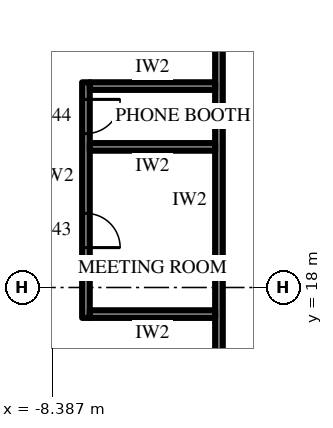
"""IFC4 building model, lengths in metres.
Left out: names, types, materials, properties, quantities, classifications, styles, units other than length and angle.
Written with IfcOpenShell. Run it as: python <this file> out.ifc"""

import sys

from ifc_helpers import new_model, si_unit, direction, frame, frame_2d, origin, place, context, subcontext, project, spatial, rectangle, extrude, element, fill, save


model = new_model("IFC4")
c1 = context("Model", 3, precision=1e-05, world=origin(), true_north=direction((0.0, 1.0)))
c2 = subcontext(c1, "Body", "Model", "MODEL_VIEW")
j1 = project(units=[si_unit("LENGTHUNIT", "METRE"), si_unit("PLANEANGLEUNIT", "RADIAN")], contexts=[c1])
p1 = place(None, origin())
s1 = spatial("IfcSite", under=j1, at=p1, CompositionType="ELEMENT")
p2 = place(p1, origin())
s2 = spatial("IfcBuilding", under=s1, at=p2, CompositionType="ELEMENT")
p3 = place(p2, frame((0.0, 0.0, 69.7)))
s3 = spatial("IfcBuildingStorey", under=s2, at=p3, CompositionType="ELEMENT", Elevation=69.7)
p4 = place(p3, frame((-4.0, 14.2, 0.0), z_axis=(0.0, 0.0, 1.0), x_axis=(0.0, 1.0, 0.0)))
e1 = element("IfcWall", 1, at=p4, inside=s3, PredefinedType="PARTITIONING", context=c2, shape_type="SweptSolid", body=[
    extrude(rectangle(XDim=12.2, YDim=0.2, at=frame_2d((6.1, 0.0))), origin(), (0.0, 0.0, 1.0), 4.0),
])
p5 = place(p4, frame((0.72, 0.0, 0.0)))
e2 = element("IfcOpeningElement", 2, at=p5, cuts=e1, PredefinedType="OPENING", context=c2, shape_type="SweptSolid", body=[
    extrude(rectangle(XDim=1.0, YDim=2.2, at=frame_2d((0.5, 1.1))), frame((0.0, 0.11, 0.0), z_axis=(0.0, -1.0, 0.0), x_axis=(1.0, 0.0, 0.0)), (0.0, 0.0, 1.0), 0.22),
])
p6 = place(p3, frame((-7.5, 17.2, 0.0), z_axis=(0.0, 0.0, 1.0), x_axis=(0.0, 1.0, 0.0)))
e3 = element("IfcWall", 3, at=p6, inside=s3, PredefinedType="PARTITIONING", context=c2, shape_type="SweptSolid", body=[
    extrude(rectangle(XDim=6.2, YDim=0.2, at=frame_2d((3.1, 0.0))), origin(), (0.0, 0.0, 1.0), 4.0),
])
p7 = place(p6, frame((1.85, 0.0, 0.0)))
e4 = element("IfcOpeningElement", 4, at=p7, cuts=e3, PredefinedType="OPENING", context=c2, shape_type="SweptSolid", body=[
    extrude(rectangle(XDim=0.9, YDim=2.2, at=frame_2d((0.45, 1.1))), frame((0.0, 0.11, 0.0), z_axis=(0.0, -1.0, 0.0), x_axis=(1.0, 0.0, 0.0)), (0.0, 0.0, 1.0), 0.22),
])
p8 = place(p6, frame((4.85, 0.0, 0.0)))
e5 = element("IfcOpeningElement", 5, at=p8, cuts=e3, PredefinedType="OPENING", context=c2, shape_type="SweptSolid", body=[
    extrude(rectangle(XDim=0.9, YDim=2.2, at=frame_2d((0.45, 1.1))), frame((0.0, 0.11, 0.0), z_axis=(0.0, -1.0, 0.0), x_axis=(1.0, 0.0, 0.0)), (0.0, 0.0, 1.0), 0.22),
])
for number, where, z_axis, x_axis in (
    (6, (-4.1, 17.3, 0.0), (0.0, 0.0, 1.0), (-1.0, 0.0, 0.0)),
    (7, (-4.1, 21.7, 0.0), (0.0, 0.0, 1.0), (-1.0, 0.0, 0.0)),
    (8, (-4.1, 23.3, 0.0), (0.0, 0.0, 1.0), (-1.0, 0.0, 0.0)),
):
    element("IfcWall", number, at=place(p3, frame(where, z_axis=z_axis, x_axis=x_axis)), inside=s3, PredefinedType="PARTITIONING", context=c2, shape_type="SweptSolid", body=[
        extrude(rectangle(XDim=3.3, YDim=0.2, at=frame_2d((1.65, 0.0))), origin(), (0.0, 0.0, 1.0), 4.0),
    ])
p9 = place(p7, frame((0.9, 0.0, 0.0), z_axis=(0.0, 0.0, 1.0), x_axis=(-1.0, 0.0, 0.0)))
e9 = element("IfcDoor", 9, at=p9, inside=s3, OperationType="SINGLE_SWING_LEFT", PredefinedType="DOOR", context=c2, shape_type="SweptSolid", body=[
    extrude(rectangle(XDim=0.9, YDim=2.2, at=frame_2d((0.45, 1.1))), frame((0.0, 0.025, 0.0), z_axis=(0.0, -1.0, 0.0), x_axis=(1.0, 0.0, 0.0)), (0.0, 0.0, 1.0), 0.05),
])
fill(e4, e9)
p10 = place(p8, frame((0.9, 0.0, 0.0), z_axis=(0.0, 0.0, 1.0), x_axis=(-1.0, 0.0, 0.0)))
e10 = element("IfcDoor", 10, at=p10, inside=s3, OperationType="SINGLE_SWING_RIGHT", PredefinedType="DOOR", context=c2, shape_type="SweptSolid", body=[
    extrude(rectangle(XDim=0.9, YDim=2.2, at=frame_2d((0.45, 1.1))), frame((0.0, 0.025, 0.0), z_axis=(0.0, -1.0, 0.0), x_axis=(1.0, 0.0, 0.0)), (0.0, 0.0, 1.0), 0.05),
])
fill(e5, e10)
save(model, sys.argv[1])
